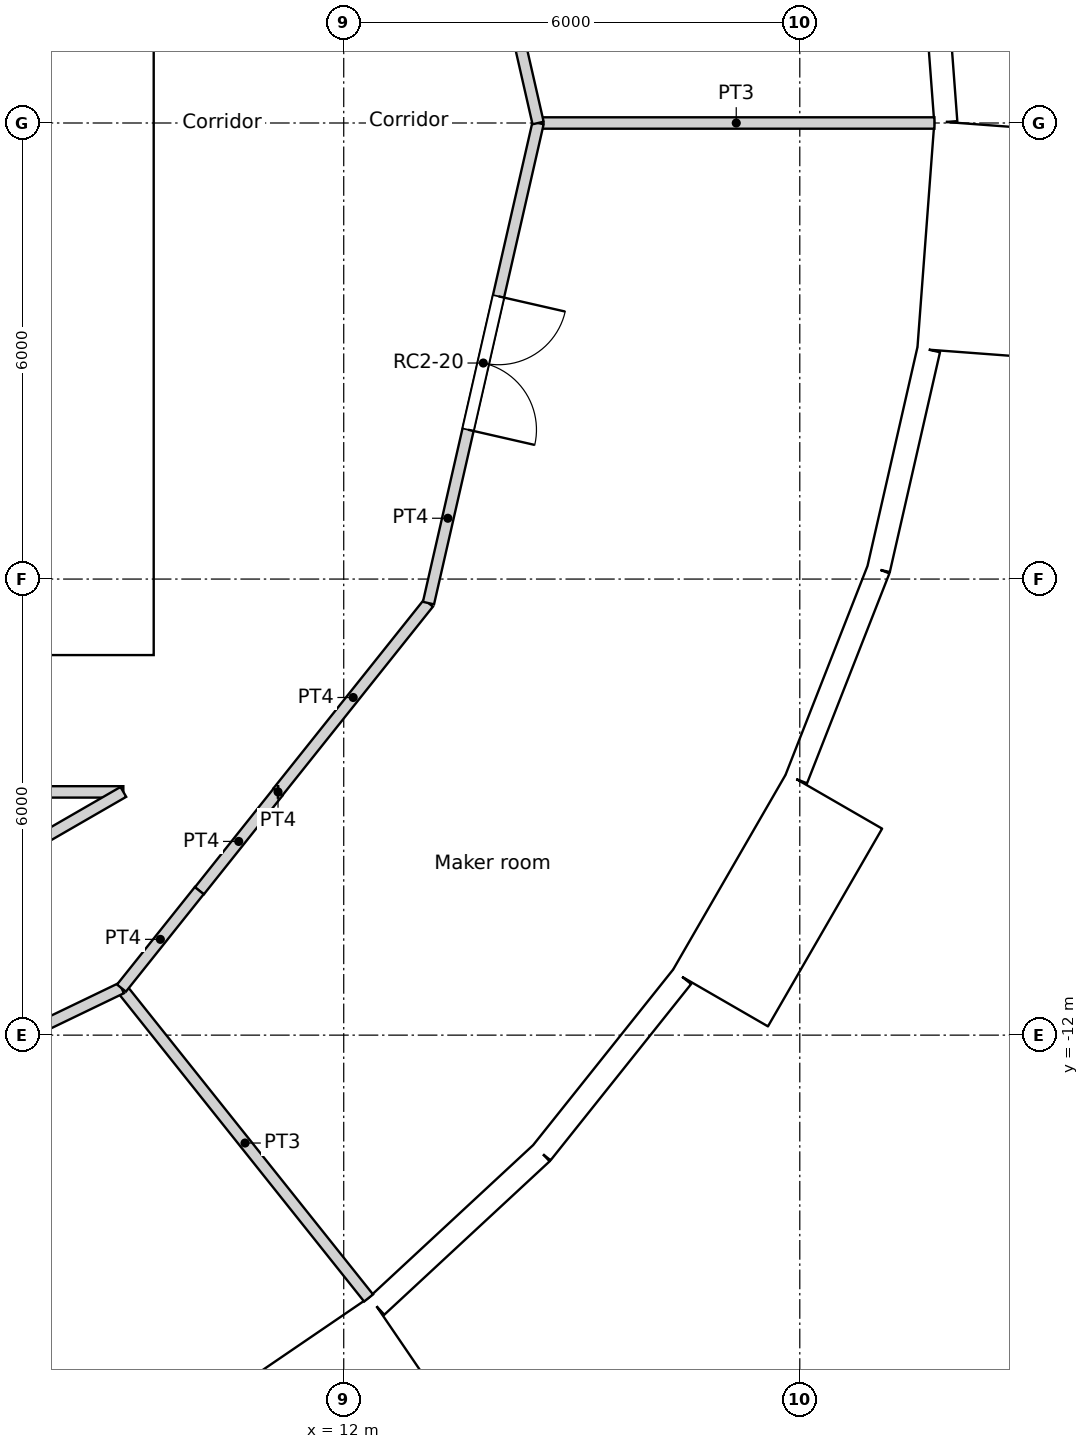
"""IFC4 building model, lengths in metres.
Left out: names, types, materials, properties, quantities, classifications, styles, units other than length and angle.
Written with IfcOpenShell. Run it as: python <this file> out.ifc"""

import sys

from ifc_helpers import new_model, si_unit, direction, frame, frame_2d, origin, origin_2d, place, context, subcontext, project, spatial, rectangle, circle, extrude, element, fill, save


model = new_model("IFC4")
c1 = context("Model", 3, precision=1e-05, world=origin(), true_north=direction((0.0, 1.0)))
c2 = subcontext(c1, "Body", "Model", "MODEL_VIEW")
j1 = project(units=[si_unit("LENGTHUNIT", "METRE"), si_unit("PLANEANGLEUNIT", "RADIAN")], contexts=[c1])
p1 = place(None, origin())
s1 = spatial("IfcSite", under=j1, at=p1, CompositionType="ELEMENT")
p2 = place(p1, origin())
s2 = spatial("IfcBuilding", under=s1, at=p2, CompositionType="ELEMENT")
p3 = place(p2, frame((0.0, 0.0, 241.8)))
s3 = spatial("IfcBuildingStorey", under=s2, at=p3, CompositionType="ELEMENT", Elevation=241.8)
for number, where, z_axis, x_axis in (
    (1, (18.822, 0.0, 0.0), (0.0, 0.0, 1.0), (1.0, 0.0, 0.0)),
    (2, (11.735, -14.716, 0.0), (0.0, 0.0, 1.0), (1.0, 0.0, 0.0)),
    (3, (15.552, -10.603, 0.0), (0.0, 0.0, 1.0), (1.0, 0.0, 0.0)),
    (4, (17.986, -5.548, 0.0), (0.0, 0.0, 1.0), (1.0, 0.0, 0.0)),
):
    element("IfcColumn", number, at=place(p3, frame(where, z_axis=z_axis, x_axis=x_axis)), inside=s3, PredefinedType="COLUMN", context=c2, shape_type="SweptSolid", body=[
        extrude(circle(Radius=0.55, at=origin_2d()), origin(), (0.0, 0.0, 1.0), 3.6),
    ])
p4 = place(p3, frame((19.921, 0.015, 0.0), z_axis=(0.0, 0.0, 1.0), x_axis=(-0.07474897196, 0.997202382263, 0.0)))
e5 = element("IfcWall", 5, at=p4, inside=s3, PredefinedType="SOLIDWALL", context=c2, shape_type="SweptSolid", body=[
    extrude(rectangle(XDim=2.962, YDim=0.3, at=frame_2d((1.481, 0.0))), origin(), (0.0, 0.0, 1.0), 3.25),
])
p5 = place(p4, frame((1.481, 0.0, 1.55)))
e6 = element("IfcOpeningElement", 6, at=p5, cuts=e5, PredefinedType="OPENING", context=c2, shape_type="SweptSolid", body=[
    extrude(circle(Radius=0.9, at=origin_2d()), frame((0.0, 0.16, 0.0), z_axis=(0.0, -1.0, 0.0), x_axis=(1.0, 0.0, 0.0)), (0.0, 0.0, 1.0), 0.32),
])
p6 = place(p3, frame((10.275, -17.734, -0.35), z_axis=(0.0, 0.0, 1.0), x_axis=(0.826246281157, 0.563309047392, 0.0)))
e7 = element("IfcWall", 7, at=p6, inside=s3, PredefinedType="ELEMENTEDWALL", context=c2, shape_type="SweptSolid", body=[
    extrude(rectangle(XDim=3.0, YDim=1.45, at=frame_2d((1.5, 0.0))), origin(), (0.0, 0.0, 1.0), 3.6),
])
p7 = place(p6, frame((1.5, 0.0, 1.9)))
e8 = element("IfcOpeningElement", 8, at=p7, cuts=e7, PredefinedType="OPENING", context=c2, shape_type="SweptSolid", body=[
    extrude(circle(Radius=0.9, at=origin_2d()), frame((0.0, 0.735, 0.0), z_axis=(0.0, -1.0, 0.0), x_axis=(1.0, 0.0, 0.0)), (0.0, 0.0, 1.0), 1.47),
])
p8 = place(p3, frame((12.432, -15.565, 0.0), z_axis=(0.0, 0.0, 1.0), x_axis=(0.733066412643, 0.680157066165, 0.0)))
e9 = element("IfcWall", 9, at=p8, inside=s3, PredefinedType="SOLIDWALL", context=c2, shape_type="SweptSolid", body=[
    extrude(rectangle(XDim=2.962, YDim=0.3, at=frame_2d((1.481, 0.0))), origin(), (0.0, 0.0, 1.0), 3.25),
])
p9 = place(p8, frame((1.481, 0.0, 1.55)))
e10 = element("IfcOpeningElement", 10, at=p9, cuts=e9, PredefinedType="OPENING", context=c2, shape_type="SweptSolid", body=[
    extrude(circle(Radius=0.9, at=origin_2d()), frame((0.0, 0.16, 0.0), z_axis=(0.0, -1.0, 0.0), x_axis=(1.0, 0.0, 0.0)), (0.0, 0.0, 1.0), 0.32),
])
p10 = place(p3, frame((14.604, -13.55, 0.0), z_axis=(0.0, 0.0, 1.0), x_axis=(0.623498236992, 0.781824755599, 0.0)))
e11 = element("IfcWall", 11, at=p10, inside=s3, PredefinedType="SOLIDWALL", context=c2, shape_type="SweptSolid", body=[
    extrude(rectangle(XDim=2.962, YDim=0.3, at=frame_2d((1.481, 0.0))), origin(), (0.0, 0.0, 1.0), 3.25),
])
p11 = place(p10, frame((1.481, 0.0, 1.55)))
e12 = element("IfcOpeningElement", 12, at=p11, cuts=e11, PredefinedType="OPENING", context=c2, shape_type="SweptSolid", body=[
    extrude(circle(Radius=0.9, at=origin_2d()), frame((0.0, 0.16, 0.0), z_axis=(0.0, -1.0, 0.0), x_axis=(1.0, 0.0, 0.0)), (0.0, 0.0, 1.0), 0.32),
])
p12 = place(p3, frame((16.952, -11.52, -0.35), z_axis=(0.0, 0.0, 1.0), x_axis=(0.499990139034, 0.866031096941, 0.0)))
e13 = element("IfcWall", 13, at=p12, inside=s3, PredefinedType="ELEMENTEDWALL", context=c2, shape_type="SweptSolid", body=[
    extrude(rectangle(XDim=3.0, YDim=1.45, at=frame_2d((1.5, 0.0))), origin(), (0.0, 0.0, 1.0), 3.6),
])
p13 = place(p12, frame((1.5, 0.0, 1.9)))
e14 = element("IfcOpeningElement", 14, at=p13, cuts=e13, PredefinedType="OPENING", context=c2, shape_type="SweptSolid", body=[
    extrude(circle(Radius=0.9, at=origin_2d()), frame((0.0, 0.735, 0.0), z_axis=(0.0, -1.0, 0.0), x_axis=(1.0, 0.0, 0.0)), (0.0, 0.0, 1.0), 1.47),
])
p14 = place(p3, frame((17.955, -8.629, 0.0), z_axis=(0.0, 0.0, 1.0), x_axis=(0.36530043032, 0.930889679612, 0.0)))
e15 = element("IfcWall", 15, at=p14, inside=s3, PredefinedType="SOLIDWALL", context=c2, shape_type="SweptSolid", body=[
    extrude(rectangle(XDim=2.962, YDim=0.3, at=frame_2d((1.481, 0.0))), origin(), (0.0, 0.0, 1.0), 3.25),
])
p15 = place(p14, frame((1.481, 0.0, 1.55)))
e16 = element("IfcOpeningElement", 16, at=p15, cuts=e15, PredefinedType="OPENING", context=c2, shape_type="SweptSolid", body=[
    extrude(circle(Radius=0.9, at=origin_2d()), frame((0.0, 0.16, 0.0), z_axis=(0.0, -1.0, 0.0), x_axis=(1.0, 0.0, 0.0)), (0.0, 0.0, 1.0), 0.32),
])
p16 = place(p3, frame((19.037, -5.872, 0.0), z_axis=(0.0, 0.0, 1.0), x_axis=(0.222529389789, 0.974925982155, 0.0)))
e17 = element("IfcWall", 17, at=p16, inside=s3, PredefinedType="SOLIDWALL", context=c2, shape_type="SweptSolid", body=[
    extrude(rectangle(XDim=2.962, YDim=0.3, at=frame_2d((1.481, 0.0))), origin(), (0.0, 0.0, 1.0), 3.25),
])
p17 = place(p16, frame((1.481, 0.0, 1.55)))
e18 = element("IfcOpeningElement", 18, at=p17, cuts=e17, PredefinedType="OPENING", context=c2, shape_type="SweptSolid", body=[
    extrude(circle(Radius=0.9, at=origin_2d()), frame((0.0, 0.16, 0.0), z_axis=(0.0, -1.0, 0.0), x_axis=(1.0, 0.0, 0.0)), (0.0, 0.0, 1.0), 0.32),
])
p18 = place(p3, frame((20.272, -3.023, -0.35), z_axis=(0.0, 0.0, 1.0), x_axis=(0.074785902127, 0.997199613339, 0.0)))
e19 = element("IfcWall", 19, at=p18, inside=s3, PredefinedType="ELEMENTEDWALL", context=c2, shape_type="SweptSolid", body=[
    extrude(rectangle(XDim=3.0, YDim=1.45, at=frame_2d((1.5, 0.0))), origin(), (0.0, 0.0, 1.0), 3.6),
])
p19 = place(p18, frame((1.5, 0.0, 1.9)))
e20 = element("IfcOpeningElement", 20, at=p19, cuts=e19, PredefinedType="OPENING", context=c2, shape_type="SweptSolid", body=[
    extrude(circle(Radius=0.9, at=origin_2d()), frame((0.0, 0.735, 0.0), z_axis=(0.0, -1.0, 0.0), x_axis=(1.0, 0.0, 0.0)), (0.0, 0.0, 1.0), 1.47),
])
p20 = place(p3, frame((-9.5, -6.7, 0.0), z_axis=(0.0, 0.0, 1.0), x_axis=(1.0, 0.0, 0.0)))
e21 = element("IfcWall", 21, at=p20, inside=s3, PredefinedType="SOLIDWALL", context=c2, shape_type="SweptSolid", body=[
    extrude(rectangle(XDim=19.0, YDim=0.6, at=frame_2d((9.5, 0.0))), origin(), (0.0, 0.0, 1.0), 3.6),
])
p21 = place(p20, frame((10.4, 0.0, 0.0)))
e22 = element("IfcOpeningElement", 22, at=p21, cuts=e21, PredefinedType="OPENING", context=c2, shape_type="SweptSolid", body=[
    extrude(rectangle(XDim=1.0, YDim=2.1, at=frame_2d((0.5, 1.05))), frame((0.0, 0.3, 0.0), z_axis=(0.0, -1.0, 0.0), x_axis=(1.0, 0.0, 0.0)), (0.0, 0.0, 1.0), 0.6),
])
p22 = place(p20, frame((5.35, 0.0, 0.0)))
e23 = element("IfcOpeningElement", 23, at=p22, cuts=e21, PredefinedType="OPENING", context=c2, shape_type="SweptSolid", body=[
    extrude(rectangle(XDim=1.7, YDim=2.1, at=frame_2d((0.85, 1.05))), frame((0.0, 0.3, 0.0), z_axis=(0.0, -1.0, 0.0), x_axis=(1.0, 0.0, 0.0)), (0.0, 0.0, 1.0), 0.6),
])
p23 = place(p20, frame((11.95, 0.0, 0.0)))
e24 = element("IfcOpeningElement", 24, at=p23, cuts=e21, PredefinedType="OPENING", context=c2, shape_type="SweptSolid", body=[
    extrude(rectangle(XDim=1.7, YDim=2.1, at=frame_2d((0.85, 1.05))), frame((0.0, 0.3, 0.0), z_axis=(0.0, -1.0, 0.0), x_axis=(1.0, 0.0, 0.0)), (0.0, 0.0, 1.0), 0.6),
])
p24 = place(p3, frame((9.2, -6.4, 0.0), z_axis=(0.0, 0.0, 1.0), x_axis=(0.0, 1.0, 0.0)))
e25 = element("IfcWall", 25, at=p24, inside=s3, PredefinedType="SOLIDWALL", context=c2, shape_type="SweptSolid", body=[
    extrude(rectangle(XDim=12.8, YDim=0.6, at=frame_2d((6.4, 0.0))), origin(), (0.0, 0.0, 1.0), 3.6),
])
p25 = place(p24, frame((6.4, 0.0, 0.0)))
e26 = element("IfcOpeningElement", 26, at=p25, cuts=e25, PredefinedType="OPENING", context=c2, shape_type="SweptSolid", body=[
    extrude(rectangle(XDim=1.8, YDim=2.1, at=frame_2d((0.9, 1.05))), frame((0.0, 0.3, 0.0), z_axis=(0.0, -1.0, 0.0), x_axis=(1.0, 0.0, 0.0)), (0.0, 0.0, 1.0), 0.6),
])
p26 = place(p3, frame((2.1, -3.1, 0.0), z_axis=(0.0, 0.0, 1.0), x_axis=(1.0, 0.0, 0.0)))
e27 = element("IfcWall", 27, at=p26, inside=s3, PredefinedType="SOLIDWALL", context=c2, shape_type="SweptSolid", body=[
    extrude(rectangle(XDim=6.8, YDim=0.3, at=frame_2d((3.4, 0.0))), origin(), (0.0, 0.0, 1.0), 3.25),
])
p27 = place(p26, frame((0.35, 0.0, 0.0)))
e28 = element("IfcOpeningElement", 28, at=p27, cuts=e27, PredefinedType="OPENING", context=c2, shape_type="SweptSolid", body=[
    extrude(rectangle(XDim=1.7, YDim=2.1, at=frame_2d((0.85, 1.05))), frame((0.0, 0.15, 0.0), z_axis=(0.0, -1.0, 0.0), x_axis=(1.0, 0.0, 0.0)), (0.0, 0.0, 1.0), 0.3),
])
p28 = place(p3, frame((5.85, -0.425, 0.0), z_axis=(0.0, 0.0, 1.0), x_axis=(1.0, 0.0, 0.0)))
e29 = element("IfcWall", 29, at=p28, inside=s3, PredefinedType="SOLIDWALL", context=c2, shape_type="SweptSolid", body=[
    extrude(rectangle(XDim=3.05, YDim=0.15, at=frame_2d((1.525, 0.0))), origin(), (0.0, 0.0, 1.0), 3.25),
])
p29 = place(p28, frame((0.525, 0.0, 0.0)))
e30 = element("IfcOpeningElement", 30, at=p29, cuts=e29, PredefinedType="OPENING", context=c2, shape_type="SweptSolid", body=[
    extrude(rectangle(XDim=0.9, YDim=2.1, at=frame_2d((0.45, 1.05))), frame((0.0, 0.075, 0.0), z_axis=(0.0, -1.0, 0.0), x_axis=(1.0, 0.0, 0.0)), (0.0, 0.0, 1.0), 0.15),
])
p30 = place(p28, frame((2.05, 0.0, 0.0)))
e31 = element("IfcOpeningElement", 31, at=p30, cuts=e29, PredefinedType="OPENING", context=c2, shape_type="SweptSolid", body=[
    extrude(rectangle(XDim=0.9, YDim=2.1, at=frame_2d((0.45, 1.05))), frame((0.0, 0.075, 0.0), z_axis=(0.0, -1.0, 0.0), x_axis=(1.0, 0.0, 0.0)), (0.0, 0.0, 1.0), 0.15),
])
p31 = place(p3, frame((-9.092, -8.8, 0.0), z_axis=(0.0, 0.0, 1.0), x_axis=(1.0, 0.0, 0.0)))
e32 = element("IfcWall", 32, at=p31, inside=s3, PredefinedType="PARTITIONING", context=c2, shape_type="SweptSolid", body=[
    extrude(rectangle(XDim=18.193, YDim=0.15, at=frame_2d((9.096, 0.0))), origin(), (0.0, 0.0, 1.0), 3.25),
])
p32 = place(p31, frame((8.592, 0.0, 0.0)))
e33 = element("IfcOpeningElement", 33, at=p32, cuts=e32, PredefinedType="OPENING", context=c2, shape_type="SweptSolid", body=[
    extrude(rectangle(XDim=1.0, YDim=2.04, at=frame_2d((0.5, 1.02))), frame((0.0, 0.075, 0.0), z_axis=(0.0, -1.0, 0.0), x_axis=(1.0, 0.0, 0.0)), (0.0, 0.0, 1.0), 0.15),
])
p33 = place(p3, frame((11.137, -8.8, 0.0), z_axis=(0.0, 0.0, 1.0), x_axis=(-1.0, 0.0, 0.0)))
e34 = element("IfcWall", 34, at=p33, inside=s3, PredefinedType="PARTITIONING", context=c2, shape_type="SweptSolid", body=[
    extrude(rectangle(XDim=0.003, YDim=0.15, at=frame_2d((0.001, 0.0))), origin(), (0.0, 0.0, 1.0), 3.25),
])
p34 = place(p3, frame((10.101, -10.101, 0.0), z_axis=(0.0, 0.0, 1.0), x_axis=(0.623098344652, 0.782143498913, 0.0)))
e35 = element("IfcWall", 35, at=p34, inside=s3, PredefinedType="PARTITIONING", context=c2, shape_type="SweptSolid", body=[
    extrude(rectangle(XDim=1.661, YDim=0.15, at=frame_2d((0.831, 0.0))), origin(), (0.0, 0.0, 1.0), 3.25),
])
p35 = place(p3, frame((13.115, 6.316, 0.0), z_axis=(0.0, 0.0, 1.0), x_axis=(0.222568978642, -0.97491694505, 0.0)))
e36 = element("IfcWall", 36, at=p35, inside=s3, PredefinedType="PARTITIONING", context=c2, shape_type="SweptSolid", body=[
    extrude(rectangle(XDim=6.479, YDim=0.15, at=frame_2d((3.239, 0.0))), origin(), (0.0, 0.0, 1.0), 3.25),
])
p36 = place(p35, frame((2.339, 0.0, 0.0)))
e37 = element("IfcOpeningElement", 37, at=p36, cuts=e36, PredefinedType="OPENING", context=c2, shape_type="SweptSolid", body=[
    extrude(rectangle(XDim=1.8, YDim=2.1, at=frame_2d((0.9, 1.05))), frame((0.0, 0.075, 0.0), z_axis=(0.0, -1.0, 0.0), x_axis=(1.0, 0.0, 0.0)), (0.0, 0.0, 1.0), 0.15),
])
p37 = place(p3, frame((13.115, -6.316, 0.0), z_axis=(0.0, 0.0, 1.0), x_axis=(0.222568978642, 0.97491694505, 0.0)))
e38 = element("IfcWall", 38, at=p37, inside=s3, PredefinedType="PARTITIONING", context=c2, shape_type="SweptSolid", body=[
    extrude(rectangle(XDim=6.479, YDim=0.15, at=frame_2d((3.239, 0.0))), origin(), (0.0, 0.0, 1.0), 3.25),
])
p38 = place(p37, frame((2.34, 0.0, 0.0)))
e39 = element("IfcOpeningElement", 39, at=p38, cuts=e38, PredefinedType="OPENING", context=c2, shape_type="SweptSolid", body=[
    extrude(rectangle(XDim=1.8, YDim=2.1, at=frame_2d((0.9, 1.05))), frame((0.0, 0.075, 0.0), z_axis=(0.0, -1.0, 0.0), x_axis=(1.0, 0.0, 0.0)), (0.0, 0.0, 1.0), 0.15),
])
p39 = place(p3, frame((11.134, -8.8, 0.0), z_axis=(0.0, 0.0, 1.0), x_axis=(0.623476099415, 0.781842409606, 0.0)))
e40 = element("IfcWall", 40, at=p39, inside=s3, PredefinedType="PARTITIONING", context=c2, shape_type="SweptSolid", body=[
    extrude(rectangle(XDim=3.177, YDim=0.15, at=frame_2d((1.589, 0.0))), origin(), (0.0, 0.0, 1.0), 3.25),
])
p40 = place(p3, frame((3.261, -12.171, 0.0), z_axis=(0.0, 0.0, 1.0), x_axis=(0.866066809554, 0.499928276245, 0.0)))
e41 = element("IfcWall", 41, at=p40, inside=s3, PredefinedType="PARTITIONING", context=c2, shape_type="SweptSolid", body=[
    extrude(rectangle(XDim=6.743, YDim=0.15, at=frame_2d((3.371, 0.0))), origin(), (0.0, 0.0, 1.0), 3.25),
])
p41 = place(p3, frame((3.239, -14.192, 0.0), z_axis=(0.0, 0.0, 1.0), x_axis=(0.900976027191, 0.433868872388, 0.0)))
e42 = element("IfcWall", 42, at=p41, inside=s3, PredefinedType="PARTITIONING", context=c2, shape_type="SweptSolid", body=[
    extrude(rectangle(XDim=6.479, YDim=0.15, at=frame_2d((3.239, 0.0))), origin(), (0.0, 0.0, 1.0), 3.25),
])
p42 = place(p41, frame((2.34, 0.0, 0.0)))
e43 = element("IfcOpeningElement", 43, at=p42, cuts=e42, PredefinedType="OPENING", context=c2, shape_type="SweptSolid", body=[
    extrude(rectangle(XDim=1.8, YDim=2.1, at=frame_2d((0.9, 1.05))), frame((0.0, 0.075, 0.0), z_axis=(0.0, -1.0, 0.0), x_axis=(1.0, 0.0, 0.0)), (0.0, 0.0, 1.0), 0.15),
])
p43 = place(p3, frame((9.076, -11.381, 0.0), z_axis=(0.0, 0.0, 1.0), x_axis=(0.623805208652, 0.781579849829, 0.0)))
e44 = element("IfcWall", 44, at=p43, inside=s3, PredefinedType="PARTITIONING", context=c2, shape_type="SweptSolid", body=[
    extrude(rectangle(XDim=1.64, YDim=0.15, at=frame_2d((0.82, 0.0))), origin(), (0.0, 0.0, 1.0), 3.25),
])
p44 = place(p3, frame((14.557, 0.0, 0.0), z_axis=(0.0, 0.0, 1.0), x_axis=(1.0, 0.0, 0.0)))
e45 = element("IfcWall", 45, at=p44, inside=s3, PredefinedType="PARTITIONING", context=c2, shape_type="SweptSolid", body=[
    extrude(rectangle(XDim=5.214, YDim=0.15, at=frame_2d((2.607, 0.0))), origin(), (0.0, 0.0, 1.0), 3.25),
])
p45 = place(p3, frame((9.076, -11.381, 0.0), z_axis=(0.0, 0.0, 1.0), x_axis=(0.623460949534, -0.781854490558, 0.0)))
e46 = element("IfcWall", 46, at=p45, inside=s3, PredefinedType="PARTITIONING", context=c2, shape_type="SweptSolid", body=[
    extrude(rectangle(XDim=5.214, YDim=0.15, at=frame_2d((2.607, 0.0))), origin(), (0.0, 0.0, 1.0), 3.25),
])
p46 = place(p5, origin())
e47 = element("IfcWindow", 47, at=p46, inside=s3, PartitioningType="SINGLE_PANEL", PredefinedType="WINDOW", context=c2, shape_type="SweptSolid", body=[
    extrude(circle(Radius=0.9, at=origin_2d()), frame((0.0, 0.12, 0.0), z_axis=(0.0, -1.0, 0.0), x_axis=(1.0, 0.0, 0.0)), (0.0, 0.0, 1.0), 0.1),
])
fill(e6, e47)
p47 = place(p7, origin())
e48 = element("IfcWindow", 48, at=p47, inside=s3, PartitioningType="SINGLE_PANEL", PredefinedType="WINDOW", context=c2, shape_type="SweptSolid", body=[
    extrude(circle(Radius=0.9, at=origin_2d()), frame((0.0, 0.695, 0.0), z_axis=(0.0, -1.0, 0.0), x_axis=(1.0, 0.0, 0.0)), (0.0, 0.0, 1.0), 0.1),
])
fill(e8, e48)
p48 = place(p9, origin())
e49 = element("IfcWindow", 49, at=p48, inside=s3, PartitioningType="SINGLE_PANEL", PredefinedType="WINDOW", context=c2, shape_type="SweptSolid", body=[
    extrude(circle(Radius=0.9, at=origin_2d()), frame((0.0, 0.12, 0.0), z_axis=(0.0, -1.0, 0.0), x_axis=(1.0, 0.0, 0.0)), (0.0, 0.0, 1.0), 0.1),
])
fill(e10, e49)
p49 = place(p11, origin())
e50 = element("IfcWindow", 50, at=p49, inside=s3, PartitioningType="SINGLE_PANEL", PredefinedType="WINDOW", context=c2, shape_type="SweptSolid", body=[
    extrude(circle(Radius=0.9, at=origin_2d()), frame((0.0, 0.12, 0.0), z_axis=(0.0, -1.0, 0.0), x_axis=(1.0, 0.0, 0.0)), (0.0, 0.0, 1.0), 0.1),
])
fill(e12, e50)
p50 = place(p13, origin())
e51 = element("IfcWindow", 51, at=p50, inside=s3, PartitioningType="SINGLE_PANEL", PredefinedType="WINDOW", context=c2, shape_type="SweptSolid", body=[
    extrude(circle(Radius=0.9, at=origin_2d()), frame((0.0, 0.695, 0.0), z_axis=(0.0, -1.0, 0.0), x_axis=(1.0, 0.0, 0.0)), (0.0, 0.0, 1.0), 0.1),
])
fill(e14, e51)
p51 = place(p15, origin())
e52 = element("IfcWindow", 52, at=p51, inside=s3, PartitioningType="SINGLE_PANEL", PredefinedType="WINDOW", context=c2, shape_type="SweptSolid", body=[
    extrude(circle(Radius=0.9, at=origin_2d()), frame((0.0, 0.12, 0.0), z_axis=(0.0, -1.0, 0.0), x_axis=(1.0, 0.0, 0.0)), (0.0, 0.0, 1.0), 0.1),
])
fill(e16, e52)
p52 = place(p17, origin())
e53 = element("IfcWindow", 53, at=p52, inside=s3, PartitioningType="SINGLE_PANEL", PredefinedType="WINDOW", context=c2, shape_type="SweptSolid", body=[
    extrude(circle(Radius=0.9, at=origin_2d()), frame((0.0, 0.12, 0.0), z_axis=(0.0, -1.0, 0.0), x_axis=(1.0, 0.0, 0.0)), (0.0, 0.0, 1.0), 0.1),
])
fill(e18, e53)
p53 = place(p19, origin())
e54 = element("IfcWindow", 54, at=p53, inside=s3, PartitioningType="SINGLE_PANEL", PredefinedType="WINDOW", context=c2, shape_type="SweptSolid", body=[
    extrude(circle(Radius=0.9, at=origin_2d()), frame((0.0, 0.695, 0.0), z_axis=(0.0, -1.0, 0.0), x_axis=(1.0, 0.0, 0.0)), (0.0, 0.0, 1.0), 0.1),
])
fill(e20, e54)
p54 = place(p25, origin())
e55 = element("IfcDoor", 55, at=p54, inside=s3, OperationType="DOUBLE_DOOR_SINGLE_SWING", PredefinedType="DOOR", context=c2, shape_type="SweptSolid", body=[
    extrude(rectangle(XDim=1.8, YDim=2.1, at=frame_2d((0.9, 1.05))), frame((0.0, 0.025, 0.0), z_axis=(0.0, -1.0, 0.0), x_axis=(1.0, 0.0, 0.0)), (0.0, 0.0, 1.0), 0.05),
])
fill(e26, e55)
p55 = place(p30, origin())
e56 = element("IfcDoor", 56, at=p55, inside=s3, OperationType="SINGLE_SWING_LEFT", PredefinedType="DOOR", context=c2, shape_type="SweptSolid", body=[
    extrude(rectangle(XDim=0.9, YDim=2.1, at=frame_2d((0.45, 1.05))), frame((0.0, 0.025, 0.0), z_axis=(0.0, -1.0, 0.0), x_axis=(1.0, 0.0, 0.0)), (0.0, 0.0, 1.0), 0.05),
])
fill(e31, e56)
p56 = place(p38, origin())
e57 = element("IfcDoor", 57, at=p56, inside=s3, OperationType="DOUBLE_DOOR_SINGLE_SWING", PredefinedType="DOOR", context=c2, shape_type="SweptSolid", body=[
    extrude(rectangle(XDim=1.8, YDim=2.1, at=frame_2d((0.9, 1.05))), frame((0.0, 0.025, 0.0), z_axis=(0.0, -1.0, 0.0), x_axis=(1.0, 0.0, 0.0)), (0.0, 0.0, 1.0), 0.05),
])
fill(e39, e57)
save(model, sys.argv[1])
